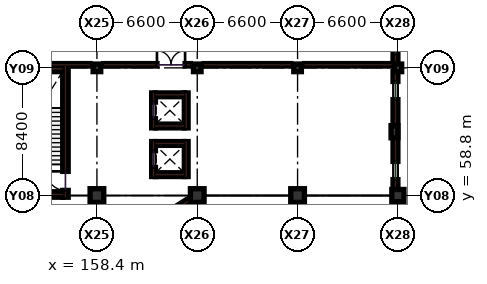
"""IFC4 building model, lengths in metres.
Left out: names, types, materials, properties, quantities, classifications, styles, units other than length and angle.
Written with IfcOpenShell. Run it as: python <this file> out.ifc"""

import sys

from ifc_helpers import new_model, si_unit, direction, frame, frame_2d, origin, origin_2d, place, context, subcontext, project, spatial, rectangle, extrude, element, fill, save


model = new_model("IFC4")
c1 = context("Model", 3, precision=1e-05, world=origin(), true_north=direction((0.0, 1.0)))
c2 = subcontext(c1, "Body", "Model", "MODEL_VIEW")
j1 = project(units=[si_unit("LENGTHUNIT", "METRE"), si_unit("PLANEANGLEUNIT", "RADIAN")], contexts=[c1])
p1 = place(None, origin())
s1 = spatial("IfcSite", under=j1, at=p1, CompositionType="ELEMENT")
p2 = place(p1, origin())
s2 = spatial("IfcBuilding", under=s1, at=p2, CompositionType="ELEMENT")
p3 = place(p2, frame((0.0, 0.0, 9.9)))
s3 = spatial("IfcBuildingStorey", under=s2, at=p3, CompositionType="ELEMENT", Elevation=9.9)
p4 = place(p3, frame((158.4, 58.8, 0.0), z_axis=(0.0, 0.0, 1.0), x_axis=(1.0, 0.0, 0.0)))
e1 = element("IfcColumn", 1, at=p4, inside=s3, PredefinedType="COLUMN", context=c2, shape_type="SweptSolid", body=[
    extrude(rectangle(XDim=0.9, YDim=0.9, at=origin_2d()), origin(), (0.0, 0.0, 1.0), 4.5),
])
p5 = place(p3, frame((158.4, 67.2, 0.0), z_axis=(0.0, 0.0, 1.0), x_axis=(1.0, 0.0, 0.0)))
e2 = element("IfcColumn", 2, at=p5, inside=s3, PredefinedType="COLUMN", context=c2, shape_type="SweptSolid", body=[
    extrude(rectangle(XDim=0.5, YDim=0.5, at=origin_2d()), origin(), (0.0, 0.0, 1.0), 4.5),
])
p6 = place(p3, frame((165.0, 58.8, 0.0), z_axis=(0.0, 0.0, 1.0), x_axis=(1.0, 0.0, 0.0)))
e3 = element("IfcColumn", 3, at=p6, inside=s3, PredefinedType="COLUMN", context=c2, shape_type="SweptSolid", body=[
    extrude(rectangle(XDim=0.9, YDim=0.9, at=origin_2d()), origin(), (0.0, 0.0, 1.0), 4.5),
])
p7 = place(p3, frame((165.0, 67.2, 0.0), z_axis=(0.0, 0.0, 1.0), x_axis=(1.0, 0.0, 0.0)))
e4 = element("IfcColumn", 4, at=p7, inside=s3, PredefinedType="COLUMN", context=c2, shape_type="SweptSolid", body=[
    extrude(rectangle(XDim=0.5, YDim=0.5, at=origin_2d()), origin(), (0.0, 0.0, 1.0), 4.5),
])
p8 = place(p3, frame((171.6, 58.8, 0.0), z_axis=(0.0, 0.0, 1.0), x_axis=(1.0, 0.0, 0.0)))
e5 = element("IfcColumn", 5, at=p8, inside=s3, PredefinedType="COLUMN", context=c2, shape_type="SweptSolid", body=[
    extrude(rectangle(XDim=0.9, YDim=0.9, at=origin_2d()), origin(), (0.0, 0.0, 1.0), 4.5),
])
p9 = place(p3, frame((171.6, 67.2, 0.0), z_axis=(0.0, 0.0, 1.0), x_axis=(1.0, 0.0, 0.0)))
e6 = element("IfcColumn", 6, at=p9, inside=s3, PredefinedType="COLUMN", context=c2, shape_type="SweptSolid", body=[
    extrude(rectangle(XDim=0.5, YDim=0.5, at=origin_2d()), origin(), (0.0, 0.0, 1.0), 4.5),
])
p10 = place(p3, frame((178.2, 58.8, 0.0), z_axis=(0.0, 0.0, 1.0), x_axis=(1.0, 0.0, 0.0)))
e7 = element("IfcColumn", 7, at=p10, inside=s3, PredefinedType="COLUMN", context=c2, shape_type="SweptSolid", body=[
    extrude(rectangle(XDim=0.8, YDim=0.8, at=origin_2d()), origin(), (0.0, 0.0, 1.0), 4.5),
])
p11 = place(p3, frame((178.2, 67.2, 0.0), z_axis=(0.0, 0.0, 1.0), x_axis=(1.0, 0.0, 0.0)))
e8 = element("IfcColumn", 8, at=p11, inside=s3, PredefinedType="COLUMN", context=c2, shape_type="SweptSolid", body=[
    extrude(rectangle(XDim=0.5, YDim=0.5, at=origin_2d()), origin(), (0.0, 0.0, 1.0), 4.5),
])
p12 = place(p3, frame((177.975, 63.0, 0.0), z_axis=(0.0, 0.0, 1.0), x_axis=(1.0, 0.0, 0.0)))
e9 = element("IfcColumn", 9, at=p12, inside=s3, PredefinedType="PILASTER", context=c2, shape_type="SweptSolid", body=[
    extrude(rectangle(XDim=0.45, YDim=0.8, at=origin_2d()), origin(), (0.0, 0.0, 1.0), 4.5),
])
p13 = place(p3, frame((152.0, 67.4, 0.0), z_axis=(0.0, 0.0, 1.0), x_axis=(1.0, 0.0, 0.0)))
e10 = element("IfcWall", 10, at=p13, inside=s3, PredefinedType="PARTITIONING", context=c2, shape_type="SweptSolid", body=[
    extrude(rectangle(XDim=5.95, YDim=0.16, at=frame_2d((2.975, 0.0))), origin(), (0.0, 0.0, 1.0), 3.49),
])
p14 = place(p3, frame((158.85, 67.4, 0.0), z_axis=(0.0, 0.0, 1.0), x_axis=(1.0, 0.0, 0.0)))
e11 = element("IfcWall", 11, at=p14, inside=s3, PredefinedType="PARTITIONING", context=c2, shape_type="SweptSolid", body=[
    extrude(rectangle(XDim=5.7, YDim=0.16, at=frame_2d((2.85, 0.0))), origin(), (0.0, 0.0, 1.0), 3.49),
])
p15 = place(p14, frame((3.5, 0.0, 0.0)))
e12 = element("IfcOpeningElement", 12, at=p15, cuts=e11, PredefinedType="OPENING", context=c2, shape_type="SweptSolid", body=[
    extrude(rectangle(XDim=1.85, YDim=2.25, at=frame_2d((0.925, 1.125))), frame((0.0, 0.09, 0.0), z_axis=(0.0, -1.0, 0.0), x_axis=(1.0, 0.0, 0.0)), (0.0, 0.0, 1.0), 0.18),
])
p16 = place(p3, frame((165.45, 67.4, 0.0), z_axis=(0.0, 0.0, 1.0), x_axis=(1.0, 0.0, 0.0)))
e13 = element("IfcWall", 13, at=p16, inside=s3, PredefinedType="PARTITIONING", context=c2, shape_type="SweptSolid", body=[
    extrude(rectangle(XDim=5.7, YDim=0.16, at=frame_2d((2.85, 0.0))), origin(), (0.0, 0.0, 1.0), 3.49),
])
p17 = place(p3, frame((172.05, 67.4, 0.0), z_axis=(0.0, 0.0, 1.0), x_axis=(1.0, 0.0, 0.0)))
e14 = element("IfcWall", 14, at=p17, inside=s3, PredefinedType="PARTITIONING", context=c2, shape_type="SweptSolid", body=[
    extrude(rectangle(XDim=5.83, YDim=0.16, at=frame_2d((2.915, 0.0))), origin(), (0.0, 0.0, 1.0), 3.49),
])
p18 = place(p3, frame((165.3, 50.85, 0.0), z_axis=(0.0, 0.0, 1.0), x_axis=(0.0, 1.0, 0.0)))
e15 = element("IfcWall", 15, at=p18, inside=s3, PredefinedType="SOLIDWALL", context=c2, shape_type="SweptSolid", body=[
    extrude(rectangle(XDim=7.53, YDim=0.18, at=frame_2d((3.765, 0.0))), origin(), (0.0, 0.0, 1.0), 3.49),
])
p19 = place(p18, frame((4.4, 0.0, 0.0)))
e16 = element("IfcOpeningElement", 16, at=p19, cuts=e15, PredefinedType="OPENING", context=c2, shape_type="SweptSolid", body=[
    extrude(rectangle(XDim=1.6, YDim=2.2, at=frame_2d((0.8, 1.1))), frame((0.0, 0.1, 0.0), z_axis=(0.0, -1.0, 0.0), x_axis=(1.0, 0.0, 0.0)), (0.0, 0.0, 1.0), 0.2),
])
p20 = place(p3, frame((178.04, 50.795, 0.0), z_axis=(0.0, 0.0, 1.0), x_axis=(0.0, 1.0, 0.0)))
e17 = element("IfcWall", 17, at=p20, inside=s3, PredefinedType="SOLIDWALL", context=c2, shape_type="SweptSolid", body=[
    extrude(rectangle(XDim=7.61, YDim=0.32, at=frame_2d((3.805, 0.0))), origin(), (0.0, 0.0, 1.0), 3.625),
])
p21 = place(p20, frame((3.23, 0.0, 0.95)))
e18 = element("IfcOpeningElement", 18, at=p21, cuts=e17, PredefinedType="OPENING", context=c2, shape_type="SweptSolid", body=[
    extrude(rectangle(XDim=1.15, YDim=1.6, at=frame_2d((0.575, 0.8))), frame((0.0, 0.17, 0.0), z_axis=(0.0, -1.0, 0.0), x_axis=(1.0, 0.0, 0.0)), (0.0, 0.0, 1.0), 0.34),
])
p22 = place(p3, frame((178.04, 59.195, 0.0), z_axis=(0.0, 0.0, 1.0), x_axis=(0.0, 1.0, 0.0)))
e19 = element("IfcWall", 19, at=p22, inside=s3, PredefinedType="SOLIDWALL", context=c2, shape_type="SweptSolid", body=[
    extrude(rectangle(XDim=7.76, YDim=0.32, at=frame_2d((3.88, 0.0))), origin(), (0.0, 0.0, 1.0), 3.625),
])
p23 = place(p22, frame((0.65, 0.0, 0.95)))
e20 = element("IfcOpeningElement", 20, at=p23, cuts=e19, PredefinedType="OPENING", context=c2, shape_type="SweptSolid", body=[
    extrude(rectangle(XDim=1.2, YDim=1.5, at=frame_2d((0.6, 0.75))), frame((0.0, 0.17, 0.0), z_axis=(0.0, -1.0, 0.0), x_axis=(1.0, 0.0, 0.0)), (0.0, 0.0, 1.0), 0.34),
])
p24 = place(p22, frame((5.91, 0.0, 0.95)))
e21 = element("IfcOpeningElement", 21, at=p24, cuts=e19, PredefinedType="OPENING", context=c2, shape_type="SweptSolid", body=[
    extrude(rectangle(XDim=1.2, YDim=1.5, at=frame_2d((0.6, 0.75))), frame((0.0, 0.17, 0.0), z_axis=(0.0, -1.0, 0.0), x_axis=(1.0, 0.0, 0.0)), (0.0, 0.0, 1.0), 0.34),
])
p25 = place(p3, frame((178.04, 67.445, 0.0), z_axis=(0.0, 0.0, 1.0), x_axis=(0.0, 1.0, 0.0)))
e22 = element("IfcWall", 22, at=p25, inside=s3, PredefinedType="SOLIDWALL", context=c2, shape_type="SweptSolid", body=[
    extrude(rectangle(XDim=7.91, YDim=0.32, at=frame_2d((3.955, 0.0))), origin(), (0.0, 0.0, 1.0), 3.625),
])
p26 = place(p25, frame((0.65, 0.0, 0.95)))
e23 = element("IfcOpeningElement", 23, at=p26, cuts=e22, PredefinedType="OPENING", context=c2, shape_type="SweptSolid", body=[
    extrude(rectangle(XDim=1.2, YDim=1.5, at=frame_2d((0.6, 0.75))), frame((0.0, 0.17, 0.0), z_axis=(0.0, -1.0, 0.0), x_axis=(1.0, 0.0, 0.0)), (0.0, 0.0, 1.0), 0.34),
])
p27 = place(p25, frame((6.06, 0.0, 0.95)))
e24 = element("IfcOpeningElement", 24, at=p27, cuts=e22, PredefinedType="OPENING", context=c2, shape_type="SweptSolid", body=[
    extrude(rectangle(XDim=1.2, YDim=1.5, at=frame_2d((0.6, 0.75))), frame((0.0, 0.17, 0.0), z_axis=(0.0, -1.0, 0.0), x_axis=(1.0, 0.0, 0.0)), (0.0, 0.0, 1.0), 0.34),
])
p28 = place(p3, frame((158.65, 54.76, 0.0), z_axis=(0.0, 0.0, 1.0), x_axis=(0.843786613851, 0.536678814829, 0.0)))
e25 = element("IfcWall", 25, at=p28, inside=s3, PredefinedType="SOLIDWALL", context=c2, shape_type="SweptSolid", body=[
    extrude(rectangle(XDim=7.229, YDim=0.32, at=frame_2d((3.615, 0.0))), origin(), (0.0, 0.0, 1.0), 3.625),
])
p29 = place(p28, frame((2.415, 0.0, 0.95)))
e26 = element("IfcOpeningElement", 26, at=p29, cuts=e25, PredefinedType="OPENING", context=c2, shape_type="SweptSolid", body=[
    extrude(rectangle(XDim=2.4, YDim=1.6, at=frame_2d((1.2, 0.8))), frame((0.0, 0.17, 0.0), z_axis=(0.0, -1.0, 0.0), x_axis=(1.0, 0.0, 0.0)), (0.0, 0.0, 1.0), 0.34),
])
p30 = place(p3, frame((156.33, 58.69, 0.0), z_axis=(0.0, 0.0, 1.0), x_axis=(0.0, 1.0, 0.0)))
e27 = element("IfcWall", 27, at=p30, inside=s3, PredefinedType="SHEAR", context=c2, shape_type="SweptSolid", body=[
    extrude(rectangle(XDim=8.62, YDim=0.36, at=frame_2d((4.31, 0.0))), origin(), (0.0, 0.0, 1.0), 4.24),
])
p31 = place(p30, frame((0.45, 0.0, 0.0)))
e28 = element("IfcOpeningElement", 28, at=p31, cuts=e27, PredefinedType="OPENING", context=c2, shape_type="SweptSolid", body=[
    extrude(rectangle(XDim=1.25, YDim=2.15, at=frame_2d((0.625, 1.075))), frame((0.0, 0.19, 0.0), z_axis=(0.0, -1.0, 0.0), x_axis=(1.0, 0.0, 0.0)), (0.0, 0.0, 1.0), 0.38),
])
for number, where, z_axis, x_axis in (
    (29, (152.35, 67.13, 0.0), (0.0, 0.0, 1.0), (1.0, 0.0, 0.0)),
    (30, (152.35, 58.87, 0.0), (0.0, 0.0, 1.0), (1.0, 0.0, 0.0)),
):
    element("IfcWall", number, at=place(p3, frame(where, z_axis=z_axis, x_axis=x_axis)), inside=s3, PredefinedType="SHEAR", context=c2, shape_type="SweptSolid", body=[
        extrude(rectangle(XDim=3.8, YDim=0.36, at=frame_2d((1.9, 0.0))), origin(), (0.0, 0.0, 1.0), 4.24),
    ])
p32 = place(p3, frame((162.125, 60.05, 0.0), z_axis=(0.0, 0.0, 1.0), x_axis=(0.0, 1.0, 0.0)))
e31 = element("IfcWall", 31, at=p32, inside=s3, PredefinedType="SHEAR", context=c2, shape_type="SweptSolid", body=[
    extrude(rectangle(XDim=2.3, YDim=0.25, at=frame_2d((1.15, 0.0))), origin(), (0.0, 0.0, 1.0), 4.24),
])
p33 = place(p32, frame((0.6, 0.0, 0.0)))
e32 = element("IfcOpeningElement", 32, at=p33, cuts=e31, PredefinedType="OPENING", context=c2, shape_type="SweptSolid", body=[
    extrude(rectangle(XDim=1.1, YDim=2.15, at=frame_2d((0.55, 1.075))), frame((0.0, 0.135, 0.0), z_axis=(0.0, -1.0, 0.0), x_axis=(1.0, 0.0, 0.0)), (0.0, 0.0, 1.0), 0.27),
])
p34 = place(p3, frame((164.275, 60.05, 0.0), z_axis=(0.0, 0.0, 1.0), x_axis=(0.0, 1.0, 0.0)))
e33 = element("IfcWall", 33, at=p34, inside=s3, PredefinedType="SHEAR", context=c2, shape_type="SweptSolid", body=[
    extrude(rectangle(XDim=2.3, YDim=0.25, at=frame_2d((1.15, 0.0))), origin(), (0.0, 0.0, 1.0), 4.24),
])
for number, where, z_axis, x_axis in (
    (34, (162.25, 60.175, 0.0), (0.0, 0.0, 1.0), (1.0, 0.0, 0.0)),
    (35, (162.25, 62.225, 0.0), (0.0, 0.0, 1.0), (1.0, 0.0, 0.0)),
):
    element("IfcWall", number, at=place(p3, frame(where, z_axis=z_axis, x_axis=x_axis)), inside=s3, PredefinedType="SHEAR", context=c2, shape_type="SweptSolid", body=[
        extrude(rectangle(XDim=1.9, YDim=0.25, at=frame_2d((0.95, 0.0))), origin(), (0.0, 0.0, 1.0), 4.24),
    ])
p35 = place(p3, frame((162.125, 63.25, 0.0), z_axis=(0.0, 0.0, 1.0), x_axis=(0.0, 1.0, 0.0)))
e36 = element("IfcWall", 36, at=p35, inside=s3, PredefinedType="SHEAR", context=c2, shape_type="SweptSolid", body=[
    extrude(rectangle(XDim=2.3, YDim=0.25, at=frame_2d((1.15, 0.0))), origin(), (0.0, 0.0, 1.0), 4.24),
])
p36 = place(p35, frame((0.6, 0.0, 0.0)))
e37 = element("IfcOpeningElement", 37, at=p36, cuts=e36, PredefinedType="OPENING", context=c2, shape_type="SweptSolid", body=[
    extrude(rectangle(XDim=1.1, YDim=2.15, at=frame_2d((0.55, 1.075))), frame((0.0, 0.135, 0.0), z_axis=(0.0, -1.0, 0.0), x_axis=(1.0, 0.0, 0.0)), (0.0, 0.0, 1.0), 0.27),
])
p37 = place(p3, frame((164.275, 63.25, 0.0), z_axis=(0.0, 0.0, 1.0), x_axis=(0.0, 1.0, 0.0)))
e38 = element("IfcWall", 38, at=p37, inside=s3, PredefinedType="SHEAR", context=c2, shape_type="SweptSolid", body=[
    extrude(rectangle(XDim=2.3, YDim=0.25, at=frame_2d((1.15, 0.0))), origin(), (0.0, 0.0, 1.0), 4.24),
])
for number, where, z_axis, x_axis in (
    (39, (162.25, 63.375, 0.0), (0.0, 0.0, 1.0), (1.0, 0.0, 0.0)),
    (40, (162.25, 65.425, 0.0), (0.0, 0.0, 1.0), (1.0, 0.0, 0.0)),
):
    element("IfcWall", number, at=place(p3, frame(where, z_axis=z_axis, x_axis=x_axis)), inside=s3, PredefinedType="SHEAR", context=c2, shape_type="SweptSolid", body=[
        extrude(rectangle(XDim=1.9, YDim=0.25, at=frame_2d((0.95, 0.0))), origin(), (0.0, 0.0, 1.0), 4.24),
    ])
p38 = place(p15, origin())
e41 = element("IfcDoor", 41, at=p38, inside=s3, OperationType="DOUBLE_DOOR_SINGLE_SWING", PredefinedType="DOOR", context=c2, shape_type="SweptSolid", body=[
    extrude(rectangle(XDim=1.85, YDim=2.25, at=frame_2d((0.925, 1.125))), frame((0.0, 0.025, 0.0), z_axis=(0.0, -1.0, 0.0), x_axis=(1.0, 0.0, 0.0)), (0.0, 0.0, 1.0), 0.05),
])
fill(e12, e41)
p39 = place(p23, origin())
e42 = element("IfcWindow", 42, at=p39, inside=s3, PartitioningType="SINGLE_PANEL", PredefinedType="WINDOW", context=c2, shape_type="SweptSolid", body=[
    extrude(rectangle(XDim=1.2, YDim=1.5, at=frame_2d((0.6, 0.75))), frame((0.0, 0.03, 0.0), z_axis=(0.0, -1.0, 0.0), x_axis=(1.0, 0.0, 0.0)), (0.0, 0.0, 1.0), 0.06),
])
fill(e20, e42)
p40 = place(p24, origin())
e43 = element("IfcWindow", 43, at=p40, inside=s3, PartitioningType="SINGLE_PANEL", PredefinedType="WINDOW", context=c2, shape_type="SweptSolid", body=[
    extrude(rectangle(XDim=1.2, YDim=1.5, at=frame_2d((0.6, 0.75))), frame((0.0, 0.03, 0.0), z_axis=(0.0, -1.0, 0.0), x_axis=(1.0, 0.0, 0.0)), (0.0, 0.0, 1.0), 0.06),
])
fill(e21, e43)
p41 = place(p26, origin())
e44 = element("IfcWindow", 44, at=p41, inside=s3, PartitioningType="SINGLE_PANEL", PredefinedType="WINDOW", context=c2, shape_type="SweptSolid", body=[
    extrude(rectangle(XDim=1.2, YDim=1.5, at=frame_2d((0.6, 0.75))), frame((0.0, 0.03, 0.0), z_axis=(0.0, -1.0, 0.0), x_axis=(1.0, 0.0, 0.0)), (0.0, 0.0, 1.0), 0.06),
])
fill(e23, e44)
p42 = place(p31, origin())
e45 = element("IfcDoor", 45, at=p42, inside=s3, OperationType="SINGLE_SWING_RIGHT", PredefinedType="DOOR", context=c2, shape_type="SweptSolid", body=[
    extrude(rectangle(XDim=1.25, YDim=2.15, at=frame_2d((0.625, 1.075))), frame((0.0, 0.025, 0.0), z_axis=(0.0, -1.0, 0.0), x_axis=(1.0, 0.0, 0.0)), (0.0, 0.0, 1.0), 0.05),
])
fill(e28, e45)
p43 = place(p33, origin())
e46 = element("IfcDoor", 46, at=p43, inside=s3, OperationType="SLIDING_TO_LEFT", PredefinedType="DOOR", context=c2, shape_type="SweptSolid", body=[
    extrude(rectangle(XDim=1.1, YDim=2.15, at=frame_2d((0.55, 1.075))), frame((0.0, 0.025, 0.0), z_axis=(0.0, -1.0, 0.0), x_axis=(1.0, 0.0, 0.0)), (0.0, 0.0, 1.0), 0.05),
])
fill(e32, e46)
p44 = place(p36, origin())
e47 = element("IfcDoor", 47, at=p44, inside=s3, OperationType="SLIDING_TO_LEFT", PredefinedType="DOOR", context=c2, shape_type="SweptSolid", body=[
    extrude(rectangle(XDim=1.1, YDim=2.15, at=frame_2d((0.55, 1.075))), frame((0.0, 0.025, 0.0), z_axis=(0.0, -1.0, 0.0), x_axis=(1.0, 0.0, 0.0)), (0.0, 0.0, 1.0), 0.05),
])
fill(e37, e47)
save(model, sys.argv[1])
